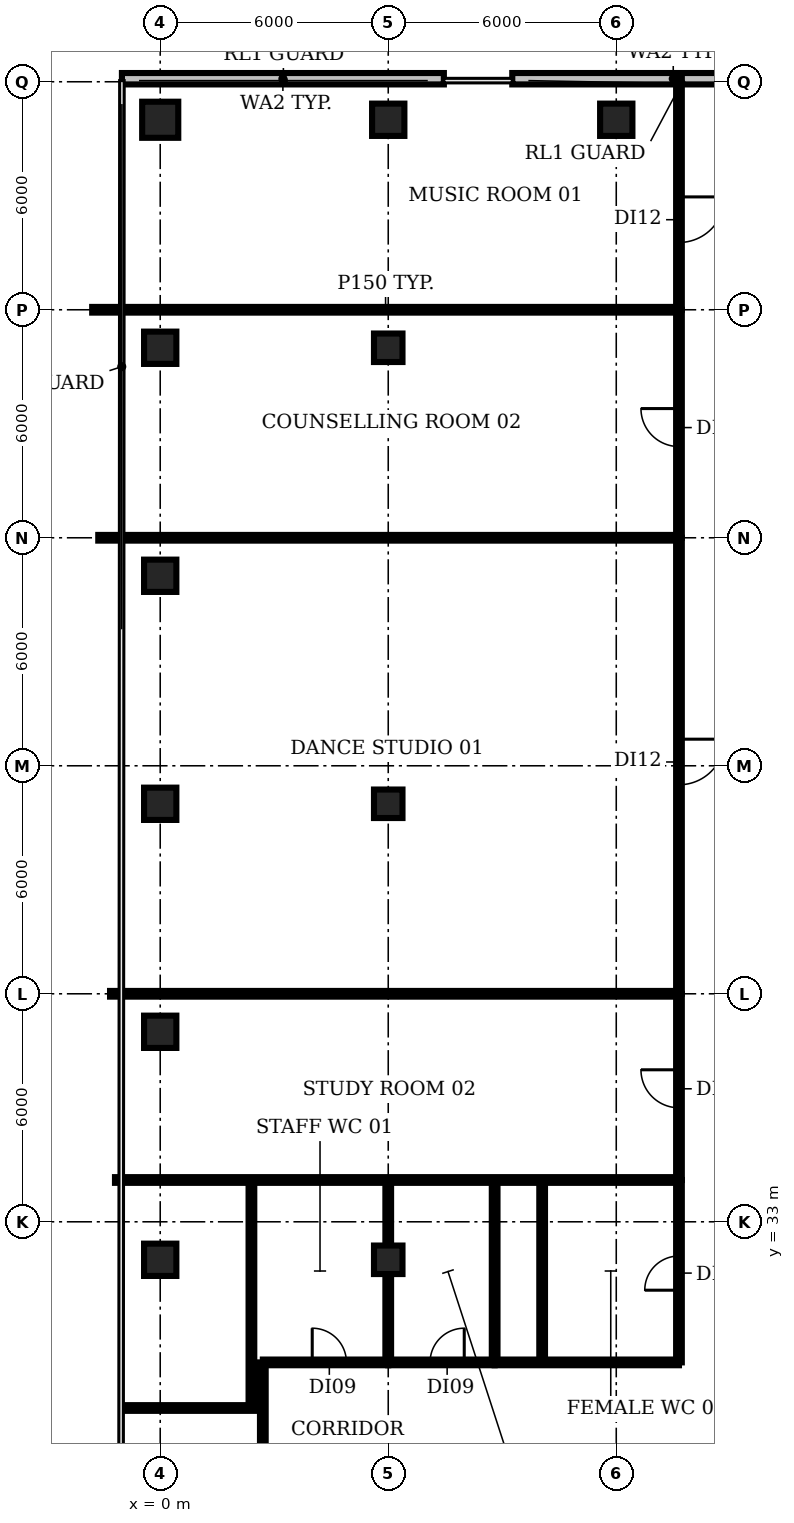
"""IFC4 building model, lengths in metres.
Left out: names, types, materials, properties, quantities, classifications, styles, units other than length and angle.
Written with IfcOpenShell. Run it as: python <this file> out.ifc"""

import sys

from ifc_helpers import new_model, si_unit, direction, frame, frame_2d, origin, origin_2d, place, context, subcontext, project, spatial, rectangle, circle, extrude, element, fill, save


model = new_model("IFC4")
c1 = context("Model", 3, precision=1e-05, world=origin(), true_north=direction((0.0, 1.0)))
c2 = subcontext(c1, "Body", "Model", "MODEL_VIEW")
j1 = project(units=[si_unit("LENGTHUNIT", "METRE"), si_unit("PLANEANGLEUNIT", "RADIAN")], contexts=[c1])
p1 = place(None, origin())
s1 = spatial("IfcSite", under=j1, at=p1, CompositionType="ELEMENT")
p2 = place(p1, origin())
s2 = spatial("IfcBuilding", under=s1, at=p2, CompositionType="ELEMENT")
p3 = place(p2, frame((0.0, 0.0, 176.0)))
s3 = spatial("IfcBuildingStorey", under=s2, at=p3, CompositionType="ELEMENT", Elevation=176.0)
for number, where, z_axis, x_axis in (
    (1, (0.0, 32.0, 0.0), (0.0, 0.0, 1.0), (1.0, 0.0, 0.0)),
    (2, (0.0, 38.0, 0.0), (0.0, 0.0, 1.0), (1.0, 0.0, 0.0)),
    (3, (0.0, 44.0, 0.0), (0.0, 0.0, 1.0), (1.0, 0.0, 0.0)),
    (4, (0.0, 50.0, 0.0), (0.0, 0.0, 1.0), (1.0, 0.0, 0.0)),
    (5, (0.0, 56.0, 0.0), (0.0, 0.0, 1.0), (1.0, 0.0, 0.0)),
):
    element("IfcColumn", number, at=place(p3, frame(where, z_axis=z_axis, x_axis=x_axis)), inside=s3, PredefinedType="COLUMN", context=c2, shape_type="SweptSolid", body=[
        extrude(rectangle(XDim=0.85, YDim=0.85, at=origin_2d()), origin(), (0.0, 0.0, 1.0), 3.85),
    ])
p4 = place(p3, frame((0.0, 62.0, 0.0), z_axis=(0.0, 0.0, 1.0), x_axis=(1.0, 0.0, 0.0)))
e6 = element("IfcColumn", 6, at=p4, inside=s3, PredefinedType="COLUMN", context=c2, shape_type="SweptSolid", body=[
    extrude(circle(Radius=0.475, at=origin_2d()), origin(), (0.0, 0.0, 1.0), 3.85),
])
for number, where, z_axis, x_axis in (
    (7, (6.0, 32.0, 0.0), (0.0, 0.0, 1.0), (1.0, 0.0, 0.0)),
    (8, (6.0, 44.0, 0.0), (0.0, 0.0, 1.0), (1.0, 0.0, 0.0)),
    (9, (6.0, 56.0, 0.0), (0.0, 0.0, 1.0), (1.0, 0.0, 0.0)),
):
    element("IfcColumn", number, at=place(p3, frame(where, z_axis=z_axis, x_axis=x_axis)), inside=s3, PredefinedType="COLUMN", context=c2, shape_type="SweptSolid", body=[
        extrude(rectangle(XDim=0.75, YDim=0.75, at=origin_2d()), origin(), (0.0, 0.0, 1.0), 3.85),
    ])
for number, where, z_axis, x_axis in (
    (10, (6.0, 62.0, 0.0), (0.0, 0.0, 1.0), (1.0, 0.0, 0.0)),
    (11, (12.0, 62.0, 0.0), (0.0, 0.0, 1.0), (1.0, 0.0, 0.0)),
):
    element("IfcColumn", number, at=place(p3, frame(where, z_axis=z_axis, x_axis=x_axis)), inside=s3, PredefinedType="COLUMN", context=c2, shape_type="SweptSolid", body=[
        extrude(rectangle(XDim=0.85, YDim=0.85, at=origin_2d()), origin(), (0.0, 0.0, 1.0), 3.85),
    ])
p5 = place(p3, frame((17.735, 63.08, 0.0), z_axis=(0.0, 0.0, 1.0), x_axis=(-1.0, 0.0, 0.0)))
e12 = element("IfcWall", 12, at=p5, inside=s3, PredefinedType="SOLIDWALL", context=c2, shape_type="SweptSolid", body=[
    extrude(rectangle(XDim=8.471, YDim=0.3, at=frame_2d((4.236, 0.0))), origin(), (0.0, 0.0, 1.0), 3.85),
])
p6 = place(p3, frame((7.464, 63.08, 0.0), z_axis=(0.0, 0.0, 1.0), x_axis=(-1.0, 0.0, 0.0)))
e13 = element("IfcWall", 13, at=p6, inside=s3, PredefinedType="SOLIDWALL", context=c2, shape_type="SweptSolid", body=[
    extrude(rectangle(XDim=8.471, YDim=0.3, at=frame_2d((4.236, 0.0))), origin(), (0.0, 0.0, 1.0), 3.85),
])
p7 = place(p3, frame((-1.79, 57.0, 0.0), z_axis=(0.0, 0.0, 1.0), x_axis=(1.0, 0.0, 0.0)))
e14 = element("IfcWall", 14, at=p7, inside=s3, PredefinedType="PARTITIONING", context=c2, shape_type="SweptSolid", body=[
    extrude(rectangle(XDim=15.44, YDim=0.15, at=frame_2d((7.72, 0.0))), origin(), (0.0, 0.0, 1.0), 2.88),
])
p8 = place(p3, frame((-1.63, 51.0, 0.0), z_axis=(0.0, 0.0, 1.0), x_axis=(1.0, 0.0, 0.0)))
e15 = element("IfcWall", 15, at=p8, inside=s3, PredefinedType="PARTITIONING", context=c2, shape_type="SweptSolid", body=[
    extrude(rectangle(XDim=15.28, YDim=0.15, at=frame_2d((7.64, 0.0))), origin(), (0.0, 0.0, 1.0), 2.88),
])
p9 = place(p3, frame((-1.32, 39.0, 0.0), z_axis=(0.0, 0.0, 1.0), x_axis=(1.0, 0.0, 0.0)))
e16 = element("IfcWall", 16, at=p9, inside=s3, PredefinedType="PARTITIONING", context=c2, shape_type="SweptSolid", body=[
    extrude(rectangle(XDim=14.97, YDim=0.15, at=frame_2d((7.485, 0.0))), origin(), (0.0, 0.0, 1.0), 2.88),
])
p10 = place(p3, frame((-1.19, 34.1, 0.0), z_axis=(0.0, 0.0, 1.0), x_axis=(1.0, 0.0, 0.0)))
e17 = element("IfcWall", 17, at=p10, inside=s3, PredefinedType="PARTITIONING", context=c2, shape_type="SweptSolid", body=[
    extrude(rectangle(XDim=14.84, YDim=0.15, at=frame_2d((7.42, 0.0))), origin(), (0.0, 0.0, 1.0), 2.88),
])
p11 = place(p3, frame((-0.969, 28.1, 0.0), z_axis=(0.0, 0.0, 1.0), x_axis=(1.0, 0.0, 0.0)))
e18 = element("IfcWall", 18, at=p11, inside=s3, PredefinedType="PARTITIONING", context=c2, shape_type="SweptSolid", body=[
    extrude(rectangle(XDim=3.669, YDim=0.15, at=frame_2d((1.834, 0.0))), origin(), (0.0, 0.0, 1.0), 2.88),
])
p12 = place(p3, frame((2.4, 28.1, 0.0), z_axis=(0.0, 0.0, 1.0), x_axis=(0.0, 1.0, 0.0)))
e19 = element("IfcWall", 19, at=p12, inside=s3, PredefinedType="PARTITIONING", context=c2, shape_type="SweptSolid", body=[
    extrude(rectangle(XDim=6.0, YDim=0.15, at=frame_2d((3.0, 0.0))), origin(), (0.0, 0.0, 1.0), 2.88),
])
p13 = place(p3, frame((2.7, 25.4, 0.0), z_axis=(0.0, 0.0, 1.0), x_axis=(0.0, 1.0, 0.0)))
e20 = element("IfcWall", 20, at=p13, inside=s3, PredefinedType="PARTITIONING", context=c2, shape_type="SweptSolid", body=[
    extrude(rectangle(XDim=3.9, YDim=0.15, at=frame_2d((1.95, 0.0))), origin(), (0.0, 0.0, 1.0), 2.88),
])
p14 = place(p3, frame((2.7, 29.3, 0.0), z_axis=(0.0, 0.0, 1.0), x_axis=(1.0, 0.0, 0.0)))
e21 = element("IfcWall", 21, at=p14, inside=s3, PredefinedType="PARTITIONING", context=c2, shape_type="SweptSolid", body=[
    extrude(rectangle(XDim=3.3, YDim=0.15, at=frame_2d((1.65, 0.0))), origin(), (0.0, 0.0, 1.0), 2.88),
])
p15 = place(p14, frame((1.3, 0.0, 0.0)))
e22 = element("IfcOpeningElement", 22, at=p15, cuts=e21, PredefinedType="OPENING", context=c2, shape_type="SweptSolid", body=[
    extrude(rectangle(XDim=0.9, YDim=2.1, at=frame_2d((0.45, 1.05))), frame((0.0, 0.085, 0.0), z_axis=(0.0, -1.0, 0.0), x_axis=(1.0, 0.0, 0.0)), (0.0, 0.0, 1.0), 0.17),
])
p16 = place(p3, frame((6.0, 29.3, 0.0), z_axis=(0.0, 0.0, 1.0), x_axis=(0.0, 1.0, 0.0)))
e23 = element("IfcWall", 23, at=p16, inside=s3, PredefinedType="PARTITIONING", context=c2, shape_type="SweptSolid", body=[
    extrude(rectangle(XDim=4.8, YDim=0.15, at=frame_2d((2.4, 0.0))), origin(), (0.0, 0.0, 1.0), 2.88),
])
p17 = place(p3, frame((6.0, 29.3, 0.0), z_axis=(0.0, 0.0, 1.0), x_axis=(1.0, 0.0, 0.0)))
e24 = element("IfcWall", 24, at=p17, inside=s3, PredefinedType="PARTITIONING", context=c2, shape_type="SweptSolid", body=[
    extrude(rectangle(XDim=2.8, YDim=0.15, at=frame_2d((1.4, 0.0))), origin(), (0.0, 0.0, 1.0), 2.88),
])
p18 = place(p17, frame((1.1, 0.0, 0.0)))
e25 = element("IfcOpeningElement", 25, at=p18, cuts=e24, PredefinedType="OPENING", context=c2, shape_type="SweptSolid", body=[
    extrude(rectangle(XDim=0.9, YDim=2.1, at=frame_2d((0.45, 1.05))), frame((0.0, 0.085, 0.0), z_axis=(0.0, -1.0, 0.0), x_axis=(1.0, 0.0, 0.0)), (0.0, 0.0, 1.0), 0.17),
])
p19 = place(p3, frame((8.8, 29.3, 0.0), z_axis=(0.0, 0.0, 1.0), x_axis=(0.0, 1.0, 0.0)))
e26 = element("IfcWall", 26, at=p19, inside=s3, PredefinedType="PARTITIONING", context=c2, shape_type="SweptSolid", body=[
    extrude(rectangle(XDim=4.8, YDim=0.15, at=frame_2d((2.4, 0.0))), origin(), (0.0, 0.0, 1.0), 2.88),
])
p20 = place(p3, frame((8.8, 29.3, 0.0), z_axis=(0.0, 0.0, 1.0), x_axis=(1.0, 0.0, 0.0)))
e27 = element("IfcWall", 27, at=p20, inside=s3, PredefinedType="PARTITIONING", context=c2, shape_type="SweptSolid", body=[
    extrude(rectangle(XDim=4.85, YDim=0.15, at=frame_2d((2.425, 0.0))), origin(), (0.0, 0.0, 1.0), 2.88),
])
p21 = place(p3, frame((10.05, 29.3, 0.0), z_axis=(0.0, 0.0, 1.0), x_axis=(0.0, 1.0, 0.0)))
e28 = element("IfcWall", 28, at=p21, inside=s3, PredefinedType="PARTITIONING", context=c2, shape_type="SweptSolid", body=[
    extrude(rectangle(XDim=4.8, YDim=0.15, at=frame_2d((2.4, 0.0))), origin(), (0.0, 0.0, 1.0), 2.88),
])
p22 = place(p3, frame((13.65, 29.3, 0.0), z_axis=(0.0, 0.0, 1.0), x_axis=(0.0, 1.0, 0.0)))
e29 = element("IfcWall", 29, at=p22, inside=s3, PredefinedType="PARTITIONING", context=c2, shape_type="SweptSolid", body=[
    extrude(rectangle(XDim=4.8, YDim=0.15, at=frame_2d((2.4, 0.0))), origin(), (0.0, 0.0, 1.0), 2.88),
])
p23 = place(p22, frame((1.9, 0.0, 0.0)))
e30 = element("IfcOpeningElement", 30, at=p23, cuts=e29, PredefinedType="OPENING", context=c2, shape_type="SweptSolid", body=[
    extrude(rectangle(XDim=0.9, YDim=2.1, at=frame_2d((0.45, 1.05))), frame((0.0, 0.085, 0.0), z_axis=(0.0, -1.0, 0.0), x_axis=(1.0, 0.0, 0.0)), (0.0, 0.0, 1.0), 0.17),
])
p24 = place(p3, frame((13.65, 34.1, 0.0), z_axis=(0.0, 0.0, 1.0), x_axis=(0.0, 1.0, 0.0)))
e31 = element("IfcWall", 31, at=p24, inside=s3, PredefinedType="PARTITIONING", context=c2, shape_type="SweptSolid", body=[
    extrude(rectangle(XDim=4.9, YDim=0.15, at=frame_2d((2.45, 0.0))), origin(), (0.0, 0.0, 1.0), 2.88),
])
p25 = place(p24, frame((1.9, 0.0, 0.0)))
e32 = element("IfcOpeningElement", 32, at=p25, cuts=e31, PredefinedType="OPENING", context=c2, shape_type="SweptSolid", body=[
    extrude(rectangle(XDim=1.0, YDim=2.1, at=frame_2d((0.5, 1.05))), frame((0.0, 0.085, 0.0), z_axis=(0.0, -1.0, 0.0), x_axis=(1.0, 0.0, 0.0)), (0.0, 0.0, 1.0), 0.17),
])
p26 = place(p3, frame((13.65, 51.0, 0.0), z_axis=(0.0, 0.0, 1.0), x_axis=(0.0, -1.0, 0.0)))
e33 = element("IfcWall", 33, at=p26, inside=s3, PredefinedType="PARTITIONING", context=c2, shape_type="SweptSolid", body=[
    extrude(rectangle(XDim=12.0, YDim=0.15, at=frame_2d((6.0, 0.0))), origin(), (0.0, 0.0, 1.0), 2.88),
])
p27 = place(p26, frame((5.3, 0.0, 0.0)))
e34 = element("IfcOpeningElement", 34, at=p27, cuts=e33, PredefinedType="OPENING", context=c2, shape_type="SweptSolid", body=[
    extrude(rectangle(XDim=1.2, YDim=2.1, at=frame_2d((0.6, 1.05))), frame((0.0, 0.085, 0.0), z_axis=(0.0, -1.0, 0.0), x_axis=(1.0, 0.0, 0.0)), (0.0, 0.0, 1.0), 0.17),
])
p28 = place(p3, frame((13.65, 51.0, 0.0), z_axis=(0.0, 0.0, 1.0), x_axis=(0.0, 1.0, 0.0)))
e35 = element("IfcWall", 35, at=p28, inside=s3, PredefinedType="PARTITIONING", context=c2, shape_type="SweptSolid", body=[
    extrude(rectangle(XDim=6.0, YDim=0.15, at=frame_2d((3.0, 0.0))), origin(), (0.0, 0.0, 1.0), 2.88),
])
p29 = place(p28, frame((2.4, 0.0, 0.0)))
e36 = element("IfcOpeningElement", 36, at=p29, cuts=e35, PredefinedType="OPENING", context=c2, shape_type="SweptSolid", body=[
    extrude(rectangle(XDim=1.0, YDim=2.1, at=frame_2d((0.5, 1.05))), frame((0.0, 0.085, 0.0), z_axis=(0.0, -1.0, 0.0), x_axis=(1.0, 0.0, 0.0)), (0.0, 0.0, 1.0), 0.17),
])
p30 = place(p3, frame((13.65, 63.09, 0.0), z_axis=(0.0, 0.0, 1.0), x_axis=(0.0, -1.0, 0.0)))
e37 = element("IfcWall", 37, at=p30, inside=s3, PredefinedType="PARTITIONING", context=c2, shape_type="SweptSolid", body=[
    extrude(rectangle(XDim=6.09, YDim=0.15, at=frame_2d((3.045, 0.0))), origin(), (0.0, 0.0, 1.0), 2.88),
])
p31 = place(p30, frame((3.12, 0.0, 0.0)))
e38 = element("IfcOpeningElement", 38, at=p31, cuts=e37, PredefinedType="OPENING", context=c2, shape_type="SweptSolid", body=[
    extrude(rectangle(XDim=1.2, YDim=2.1, at=frame_2d((0.6, 1.05))), frame((0.0, 0.085, 0.0), z_axis=(0.0, -1.0, 0.0), x_axis=(1.0, 0.0, 0.0)), (0.0, 0.0, 1.0), 0.17),
])
p32 = place(p15, origin())
e39 = element("IfcDoor", 39, at=p32, inside=s3, OperationType="SINGLE_SWING_LEFT", PredefinedType="DOOR", context=c2, shape_type="SweptSolid", body=[
    extrude(rectangle(XDim=0.9, YDim=2.1, at=frame_2d((0.45, 1.05))), frame((0.0, 0.025, 0.0), z_axis=(0.0, -1.0, 0.0), x_axis=(1.0, 0.0, 0.0)), (0.0, 0.0, 1.0), 0.05),
])
fill(e22, e39)
p33 = place(p18, origin())
e40 = element("IfcDoor", 40, at=p33, inside=s3, OperationType="SINGLE_SWING_RIGHT", PredefinedType="DOOR", context=c2, shape_type="SweptSolid", body=[
    extrude(rectangle(XDim=0.9, YDim=2.1, at=frame_2d((0.45, 1.05))), frame((0.0, 0.025, 0.0), z_axis=(0.0, -1.0, 0.0), x_axis=(1.0, 0.0, 0.0)), (0.0, 0.0, 1.0), 0.05),
])
fill(e25, e40)
p34 = place(p23, origin())
e41 = element("IfcDoor", 41, at=p34, inside=s3, OperationType="SINGLE_SWING_LEFT", PredefinedType="DOOR", context=c2, shape_type="SweptSolid", body=[
    extrude(rectangle(XDim=0.9, YDim=2.1, at=frame_2d((0.45, 1.05))), frame((0.0, 0.025, 0.0), z_axis=(0.0, -1.0, 0.0), x_axis=(1.0, 0.0, 0.0)), (0.0, 0.0, 1.0), 0.05),
])
fill(e30, e41)
p35 = place(p25, origin())
e42 = element("IfcDoor", 42, at=p35, inside=s3, OperationType="SINGLE_SWING_RIGHT", PredefinedType="DOOR", context=c2, shape_type="SweptSolid", body=[
    extrude(rectangle(XDim=1.0, YDim=2.1, at=frame_2d((0.5, 1.05))), frame((0.0, 0.025, 0.0), z_axis=(0.0, -1.0, 0.0), x_axis=(1.0, 0.0, 0.0)), (0.0, 0.0, 1.0), 0.05),
])
fill(e32, e42)
p36 = place(p27, origin())
e43 = element("IfcDoor", 43, at=p36, inside=s3, OperationType="SINGLE_SWING_LEFT", PredefinedType="DOOR", context=c2, shape_type="SweptSolid", body=[
    extrude(rectangle(XDim=1.2, YDim=2.1, at=frame_2d((0.6, 1.05))), frame((0.0, 0.025, 0.0), z_axis=(0.0, -1.0, 0.0), x_axis=(1.0, 0.0, 0.0)), (0.0, 0.0, 1.0), 0.05),
])
fill(e34, e43)
p37 = place(p29, origin())
e44 = element("IfcDoor", 44, at=p37, inside=s3, OperationType="SINGLE_SWING_RIGHT", PredefinedType="DOOR", context=c2, shape_type="SweptSolid", body=[
    extrude(rectangle(XDim=1.0, YDim=2.1, at=frame_2d((0.5, 1.05))), frame((0.0, 0.025, 0.0), z_axis=(0.0, -1.0, 0.0), x_axis=(1.0, 0.0, 0.0)), (0.0, 0.0, 1.0), 0.05),
])
fill(e36, e44)
p38 = place(p31, origin())
e45 = element("IfcDoor", 45, at=p38, inside=s3, OperationType="SINGLE_SWING_LEFT", PredefinedType="DOOR", context=c2, shape_type="SweptSolid", body=[
    extrude(rectangle(XDim=1.2, YDim=2.1, at=frame_2d((0.6, 1.05))), frame((0.0, 0.025, 0.0), z_axis=(0.0, -1.0, 0.0), x_axis=(1.0, 0.0, 0.0)), (0.0, 0.0, 1.0), 0.05),
])
fill(e38, e45)
save(model, sys.argv[1])
